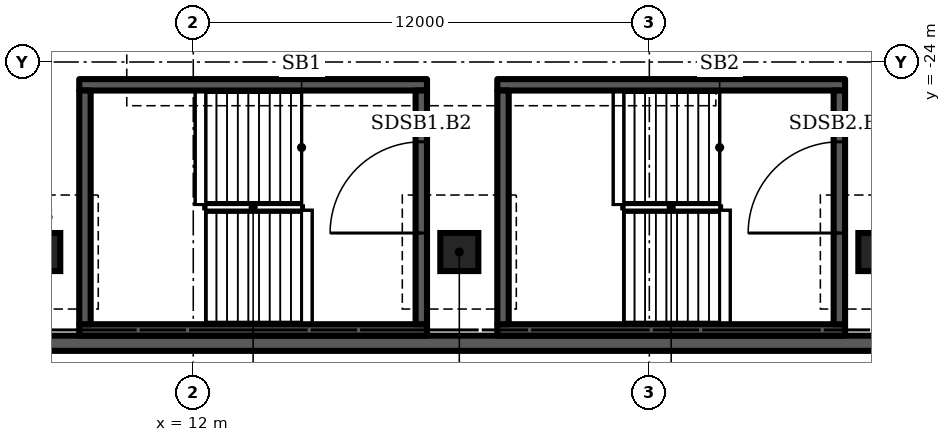
"""IFC4 building model, lengths in metres.
Left out: names, types, materials, properties, quantities, classifications, styles, units other than length and angle.
Written with IfcOpenShell. Run it as: python <this file> out.ifc"""

import sys

from ifc_helpers import new_model, si_unit, direction, frame, frame_2d, origin, origin_2d, place, context, subcontext, project, spatial, rectangle, extrude, element, fill, save


model = new_model("IFC4")
c1 = context("Model", 3, precision=1e-05, world=origin(), true_north=direction((0.0, 1.0)))
c2 = subcontext(c1, "Body", "Model", "MODEL_VIEW")
j1 = project(units=[si_unit("LENGTHUNIT", "METRE"), si_unit("PLANEANGLEUNIT", "RADIAN")], contexts=[c1])
p1 = place(None, origin())
s1 = spatial("IfcSite", under=j1, at=p1, CompositionType="ELEMENT")
p2 = place(p1, origin())
s2 = spatial("IfcBuilding", under=s1, at=p2, CompositionType="ELEMENT")
p3 = place(p2, frame((0.0, 0.0, -14.4)))
s3 = spatial("IfcBuildingStorey", under=s2, at=p3, CompositionType="ELEMENT", Elevation=-14.4)
p4 = place(p3, frame((7.5, -31.4, -0.9), z_axis=(0.0, 0.0, 1.0), x_axis=(1.0, 0.0, 0.0)))
e1 = element("IfcWall", 1, at=p4, inside=s3, PredefinedType="SOLIDWALL", context=c2, shape_type="SweptSolid", body=[
    extrude(rectangle(XDim=75.0, YDim=0.4, at=frame_2d((37.5, 0.0))), origin(), (0.0, 0.0, 1.0), 0.9),
])
for number, where, z_axis, x_axis in (
    (2, (30.0, -29.0, 0.0), (0.0, 0.0, 1.0), (1.0, 0.0, 0.0)),
    (3, (19.0, -29.0, 0.0), (0.0, 0.0, 1.0), (1.0, 0.0, 0.0)),
    (4, (8.0, -29.0, 0.0), (0.0, 0.0, 1.0), (1.0, 0.0, 0.0)),
):
    element("IfcColumn", number, at=place(p3, frame(where, z_axis=z_axis, x_axis=x_axis)), inside=s3, PredefinedType="COLUMN", context=c2, shape_type="SweptSolid", body=[
        extrude(rectangle(XDim=1.0, YDim=1.0, at=origin_2d()), origin(), (0.0, 0.0, 1.0), 7.2),
    ])
for number, where, z_axis, x_axis in (
    (5, (9.0, -31.05, 0.0), (0.0, 0.0, 1.0), (1.0, 0.0, 0.0)),
    (6, (9.0, -24.6, 0.0), (0.0, 0.0, 1.0), (1.0, 0.0, 0.0)),
):
    element("IfcWall", number, at=place(p3, frame(where, z_axis=z_axis, x_axis=x_axis)), inside=s3, PredefinedType="SHEAR", context=c2, shape_type="SweptSolid", body=[
        extrude(rectangle(XDim=9.15, YDim=0.3, at=frame_2d((4.575, 0.0))), origin(), (0.0, 0.0, 1.0), 6.9),
    ])
p5 = place(p3, frame((9.15, -30.9, 0.0), z_axis=(0.0, 0.0, 1.0), x_axis=(0.0, 1.0, 0.0)))
e7 = element("IfcWall", 7, at=p5, inside=s3, PredefinedType="SHEAR", context=c2, shape_type="SweptSolid", body=[
    extrude(rectangle(XDim=6.15, YDim=0.3, at=frame_2d((3.075, 0.0))), origin(), (0.0, 0.0, 1.0), 6.9),
])
p6 = place(p3, frame((18.0, -30.9, 0.0), z_axis=(0.0, 0.0, 1.0), x_axis=(0.0, 1.0, 0.0)))
e8 = element("IfcWall", 8, at=p6, inside=s3, PredefinedType="SHEAR", context=c2, shape_type="SweptSolid", body=[
    extrude(rectangle(XDim=6.15, YDim=0.3, at=frame_2d((3.075, 0.0))), origin(), (0.0, 0.0, 1.0), 6.9),
])
p7 = place(p6, frame((2.4, 0.0, 0.0)))
e9 = element("IfcOpeningElement", 9, at=p7, cuts=e8, PredefinedType="OPENING", context=c2, shape_type="SweptSolid", body=[
    extrude(rectangle(XDim=2.4, YDim=2.1, at=frame_2d((1.2, 1.05))), frame((0.0, 0.16, 0.0), z_axis=(0.0, -1.0, 0.0), x_axis=(1.0, 0.0, 0.0)), (0.0, 0.0, 1.0), 0.32),
])
for number, where, z_axis, x_axis in (
    (10, (20.0, -31.05, 0.0), (0.0, 0.0, 1.0), (1.0, 0.0, 0.0)),
    (11, (20.0, -24.6, 0.0), (0.0, 0.0, 1.0), (1.0, 0.0, 0.0)),
):
    element("IfcWall", number, at=place(p3, frame(where, z_axis=z_axis, x_axis=x_axis)), inside=s3, PredefinedType="SHEAR", context=c2, shape_type="SweptSolid", body=[
        extrude(rectangle(XDim=9.15, YDim=0.3, at=frame_2d((4.575, 0.0))), origin(), (0.0, 0.0, 1.0), 6.9),
    ])
p8 = place(p3, frame((20.15, -30.9, 0.0), z_axis=(0.0, 0.0, 1.0), x_axis=(0.0, 1.0, 0.0)))
e12 = element("IfcWall", 12, at=p8, inside=s3, PredefinedType="SHEAR", context=c2, shape_type="SweptSolid", body=[
    extrude(rectangle(XDim=6.15, YDim=0.3, at=frame_2d((3.075, 0.0))), origin(), (0.0, 0.0, 1.0), 6.9),
])
p9 = place(p3, frame((29.0, -30.9, 0.0), z_axis=(0.0, 0.0, 1.0), x_axis=(0.0, 1.0, 0.0)))
e13 = element("IfcWall", 13, at=p9, inside=s3, PredefinedType="SHEAR", context=c2, shape_type="SweptSolid", body=[
    extrude(rectangle(XDim=6.15, YDim=0.3, at=frame_2d((3.075, 0.0))), origin(), (0.0, 0.0, 1.0), 6.9),
])
p10 = place(p9, frame((2.4, 0.0, 0.0)))
e14 = element("IfcOpeningElement", 14, at=p10, cuts=e13, PredefinedType="OPENING", context=c2, shape_type="SweptSolid", body=[
    extrude(rectangle(XDim=2.4, YDim=2.1, at=frame_2d((1.2, 1.05))), frame((0.0, 0.16, 0.0), z_axis=(0.0, -1.0, 0.0), x_axis=(1.0, 0.0, 0.0)), (0.0, 0.0, 1.0), 0.32),
])
p11 = place(p7, origin())
e15 = element("IfcDoor", 15, at=p11, inside=s3, OperationType="DOUBLE_DOOR_SINGLE_SWING", PredefinedType="DOOR", context=c2, shape_type="SweptSolid", body=[
    extrude(rectangle(XDim=2.4, YDim=2.1, at=frame_2d((1.2, 1.05))), frame((0.0, 0.025, 0.0), z_axis=(0.0, -1.0, 0.0), x_axis=(1.0, 0.0, 0.0)), (0.0, 0.0, 1.0), 0.05),
])
fill(e9, e15)
p12 = place(p10, origin())
e16 = element("IfcDoor", 16, at=p12, inside=s3, OperationType="DOUBLE_DOOR_SINGLE_SWING", PredefinedType="DOOR", context=c2, shape_type="SweptSolid", body=[
    extrude(rectangle(XDim=2.4, YDim=2.1, at=frame_2d((1.2, 1.05))), frame((0.0, 0.025, 0.0), z_axis=(0.0, -1.0, 0.0), x_axis=(1.0, 0.0, 0.0)), (0.0, 0.0, 1.0), 0.05),
])
fill(e14, e16)
save(model, sys.argv[1])
